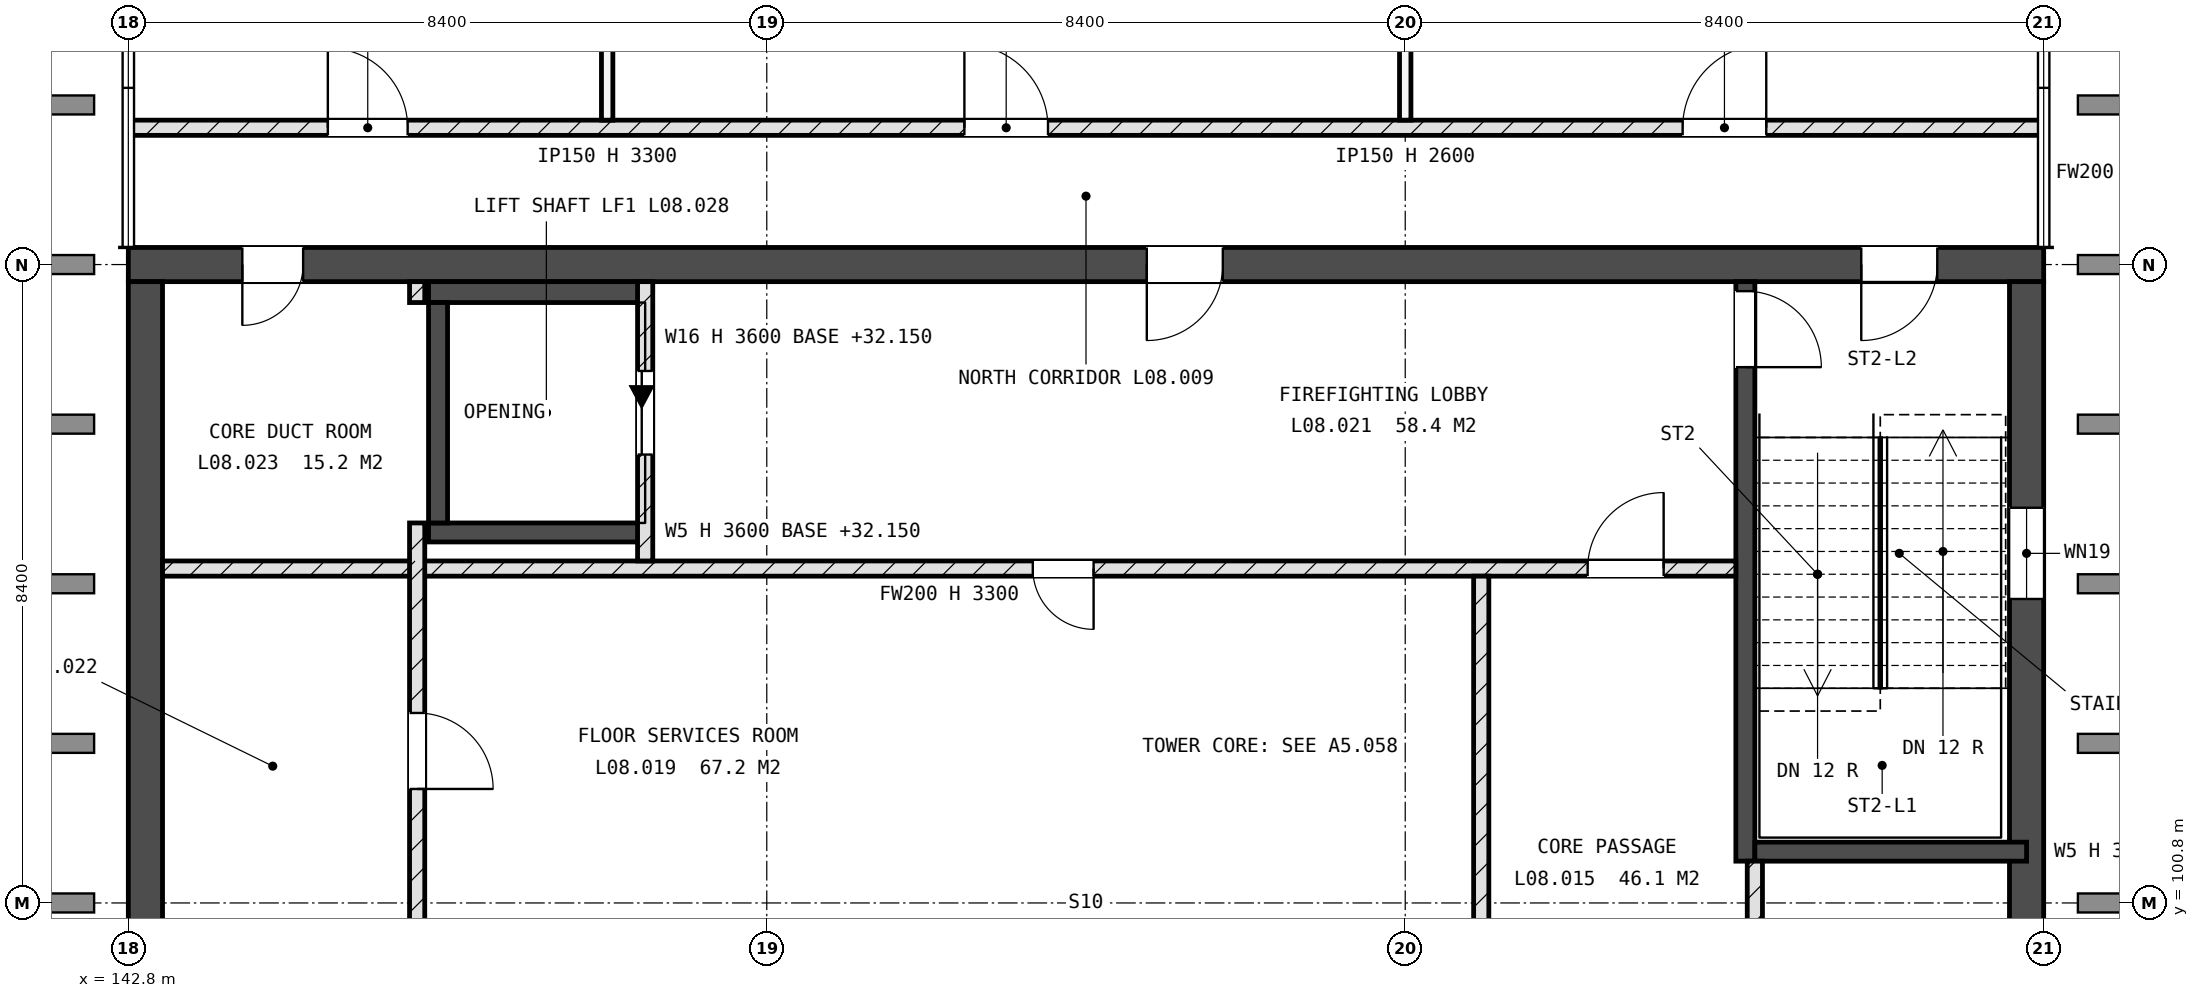
"""IFC4 building model, lengths in metres.
Left out: names, types, materials, properties, quantities, classifications, styles, units other than length and angle.
Written with IfcOpenShell. Run it as: python <this file> out.ifc"""

import sys

from ifc_helpers import new_model, si_unit, direction, frame, frame_2d, origin, place, context, subcontext, project, spatial, rectangle, extrude, element, fill, save


model = new_model("IFC4")
c1 = context("Model", 3, precision=1e-05, world=origin(), true_north=direction((0.0, 1.0)))
c2 = subcontext(c1, "Body", "Model", "MODEL_VIEW")
j1 = project(units=[si_unit("LENGTHUNIT", "METRE"), si_unit("PLANEANGLEUNIT", "RADIAN")], contexts=[c1])
p1 = place(None, origin())
s1 = spatial("IfcSite", under=j1, at=p1, CompositionType="ELEMENT")
p2 = place(p1, origin())
s2 = spatial("IfcBuilding", under=s1, at=p2, CompositionType="ELEMENT")
p3 = place(p2, frame((0.0, 0.0, 32.4)))
s3 = spatial("IfcBuildingStorey", under=s2, at=p3, CompositionType="ELEMENT", Elevation=32.4)
p4 = place(p3, frame((142.8, 109.2, -0.25), z_axis=(0.0, 0.0, 1.0), x_axis=(1.0, 0.0, 0.0)))
e1 = element("IfcWall", 1, at=p4, inside=s3, PredefinedType="SHEAR", context=c2, shape_type="SweptSolid", body=[
    extrude(rectangle(XDim=25.2, YDim=0.45, at=frame_2d((12.6, 0.0))), origin(), (0.0, 0.0, 1.0), 3.6),
])
p5 = place(p4, frame((22.8, 0.0, 0.25)))
e2 = element("IfcOpeningElement", 2, at=p5, cuts=e1, PredefinedType="OPENING", context=c2, shape_type="SweptSolid", body=[
    extrude(rectangle(XDim=1.0, YDim=2.1, at=frame_2d((0.5, 1.05))), frame((0.0, 0.235, 0.0), z_axis=(0.0, -1.0, 0.0), x_axis=(1.0, 0.0, 0.0)), (0.0, 0.0, 1.0), 0.47),
])
p6 = place(p4, frame((1.5, 0.0, 0.25)))
e3 = element("IfcOpeningElement", 3, at=p6, cuts=e1, PredefinedType="OPENING", context=c2, shape_type="SweptSolid", body=[
    extrude(rectangle(XDim=0.8, YDim=2.1, at=frame_2d((0.4, 1.05))), frame((0.0, 0.235, 0.0), z_axis=(0.0, -1.0, 0.0), x_axis=(1.0, 0.0, 0.0)), (0.0, 0.0, 1.0), 0.47),
])
p7 = place(p4, frame((13.4, 0.0, 0.25)))
e4 = element("IfcOpeningElement", 4, at=p7, cuts=e1, PredefinedType="OPENING", context=c2, shape_type="SweptSolid", body=[
    extrude(rectangle(XDim=1.0, YDim=2.1, at=frame_2d((0.5, 1.05))), frame((0.0, 0.235, 0.0), z_axis=(0.0, -1.0, 0.0), x_axis=(1.0, 0.0, 0.0)), (0.0, 0.0, 1.0), 0.47),
])
p8 = place(p3, frame((143.025, 92.625, -0.25), z_axis=(0.0, 0.0, 1.0), x_axis=(0.0, 1.0, 0.0)))
e5 = element("IfcWall", 5, at=p8, inside=s3, PredefinedType="SHEAR", context=c2, shape_type="SweptSolid", body=[
    extrude(rectangle(XDim=16.35, YDim=0.45, at=frame_2d((8.175, 0.0))), origin(), (0.0, 0.0, 1.0), 3.6),
])
p9 = place(p8, frame((2.975, 0.0, 1.85)))
e6 = element("IfcOpeningElement", 6, at=p9, cuts=e5, PredefinedType="OPENING", context=c2, shape_type="SweptSolid", body=[
    extrude(rectangle(XDim=1.2, YDim=0.9, at=frame_2d((0.6, 0.45))), frame((0.0, 0.235, 0.0), z_axis=(0.0, -1.0, 0.0), x_axis=(1.0, 0.0, 0.0)), (0.0, 0.0, 1.0), 0.47),
])
p10 = place(p3, frame((167.775, 92.625, -0.25), z_axis=(0.0, 0.0, 1.0), x_axis=(0.0, 1.0, 0.0)))
e7 = element("IfcWall", 7, at=p10, inside=s3, PredefinedType="SHEAR", context=c2, shape_type="SweptSolid", body=[
    extrude(rectangle(XDim=16.35, YDim=0.45, at=frame_2d((8.175, 0.0))), origin(), (0.0, 0.0, 1.0), 3.6),
])
p11 = place(p10, frame((12.175, 0.0, 1.85)))
e8 = element("IfcOpeningElement", 8, at=p11, cuts=e7, PredefinedType="OPENING", context=c2, shape_type="SweptSolid", body=[
    extrude(rectangle(XDim=1.2, YDim=0.9, at=frame_2d((0.6, 0.45))), frame((0.0, 0.235, 0.0), z_axis=(0.0, -1.0, 0.0), x_axis=(1.0, 0.0, 0.0)), (0.0, 0.0, 1.0), 0.47),
])
p12 = place(p3, frame((164.075, 101.35, -0.25), z_axis=(0.0, 0.0, 1.0), x_axis=(0.0, 1.0, 0.0)))
e9 = element("IfcWall", 9, at=p12, inside=s3, PredefinedType="SHEAR", context=c2, shape_type="SweptSolid", body=[
    extrude(rectangle(XDim=7.625, YDim=0.25, at=frame_2d((3.812, 0.0))), origin(), (0.0, 0.0, 1.0), 3.6),
])
p13 = place(p12, frame((6.5, 0.0, 0.25)))
e10 = element("IfcOpeningElement", 10, at=p13, cuts=e9, PredefinedType="OPENING", context=c2, shape_type="SweptSolid", body=[
    extrude(rectangle(XDim=1.0, YDim=2.1, at=frame_2d((0.5, 1.05))), frame((0.0, 0.135, 0.0), z_axis=(0.0, -1.0, 0.0), x_axis=(1.0, 0.0, 0.0)), (0.0, 0.0, 1.0), 0.27),
])
p14 = place(p3, frame((164.2, 101.475, -0.25), z_axis=(0.0, 0.0, 1.0), x_axis=(1.0, 0.0, 0.0)))
e11 = element("IfcWall", 11, at=p14, inside=s3, PredefinedType="SHEAR", context=c2, shape_type="SweptSolid", body=[
    extrude(rectangle(XDim=3.575, YDim=0.25, at=frame_2d((1.788, 0.0))), origin(), (0.0, 0.0, 1.0), 3.6),
])
p15 = place(p3, frame((146.75, 105.675, -0.25), z_axis=(0.0, 0.0, 1.0), x_axis=(1.0, 0.0, 0.0)))
e12 = element("IfcWall", 12, at=p15, inside=s3, PredefinedType="SHEAR", context=c2, shape_type="SweptSolid", body=[
    extrude(rectangle(XDim=2.85, YDim=0.25, at=frame_2d((1.425, 0.0))), origin(), (0.0, 0.0, 1.0), 3.6),
])
p16 = place(p3, frame((146.75, 108.837, -0.25), z_axis=(0.0, 0.0, 1.0), x_axis=(1.0, 0.0, 0.0)))
e13 = element("IfcWall", 13, at=p16, inside=s3, PredefinedType="SHEAR", context=c2, shape_type="SweptSolid", body=[
    extrude(rectangle(XDim=2.85, YDim=0.275, at=frame_2d((1.425, 0.0))), origin(), (0.0, 0.0, 1.0), 3.6),
])
p17 = place(p3, frame((146.875, 105.8, -0.25), z_axis=(0.0, 0.0, 1.0), x_axis=(0.0, 1.0, 0.0)))
e14 = element("IfcWall", 14, at=p17, inside=s3, PredefinedType="SHEAR", context=c2, shape_type="SweptSolid", body=[
    extrude(rectangle(XDim=2.9, YDim=0.25, at=frame_2d((1.45, 0.0))), origin(), (0.0, 0.0, 1.0), 3.6),
])
p18 = place(p3, frame((143.25, 105.2, 0.0), z_axis=(0.0, 0.0, 1.0), x_axis=(1.0, 0.0, 0.0)))
e15 = element("IfcWall", 15, at=p18, inside=s3, PredefinedType="SOLIDWALL", context=c2, shape_type="SweptSolid", body=[
    extrude(rectangle(XDim=20.7, YDim=0.2, at=frame_2d((10.35, 0.0))), origin(), (0.0, 0.0, 1.0), 3.3),
])
p19 = place(p18, frame((11.45, 0.0, 0.0)))
e16 = element("IfcOpeningElement", 16, at=p19, cuts=e15, PredefinedType="OPENING", context=c2, shape_type="SweptSolid", body=[
    extrude(rectangle(XDim=0.8, YDim=2.1, at=frame_2d((0.4, 1.05))), frame((0.0, 0.11, 0.0), z_axis=(0.0, -1.0, 0.0), x_axis=(1.0, 0.0, 0.0)), (0.0, 0.0, 1.0), 0.22),
])
p20 = place(p18, frame((18.75, 0.0, 0.0)))
e17 = element("IfcOpeningElement", 17, at=p20, cuts=e15, PredefinedType="OPENING", context=c2, shape_type="SweptSolid", body=[
    extrude(rectangle(XDim=1.0, YDim=2.1, at=frame_2d((0.5, 1.05))), frame((0.0, 0.11, 0.0), z_axis=(0.0, -1.0, 0.0), x_axis=(1.0, 0.0, 0.0)), (0.0, 0.0, 1.0), 0.22),
])
p21 = place(p3, frame((142.8, 111.0, 0.0), z_axis=(0.0, 0.0, 1.0), x_axis=(1.0, 0.0, 0.0)))
e18 = element("IfcWall", 18, at=p21, inside=s3, PredefinedType="SOLIDWALL", context=c2, shape_type="SweptSolid", body=[
    extrude(rectangle(XDim=25.2, YDim=0.2, at=frame_2d((12.6, 0.0))), origin(), (0.0, 0.0, 1.0), 3.3),
])
p22 = place(p21, frame((2.625, 0.0, 0.0)))
e19 = element("IfcOpeningElement", 19, at=p22, cuts=e18, PredefinedType="OPENING", context=c2, shape_type="SweptSolid", body=[
    extrude(rectangle(XDim=1.05, YDim=2.1, at=frame_2d((0.525, 1.05))), frame((0.0, 0.11, 0.0), z_axis=(0.0, -1.0, 0.0), x_axis=(1.0, 0.0, 0.0)), (0.0, 0.0, 1.0), 0.22),
])
p23 = place(p21, frame((11.0, 0.0, 0.0)))
e20 = element("IfcOpeningElement", 20, at=p23, cuts=e18, PredefinedType="OPENING", context=c2, shape_type="SweptSolid", body=[
    extrude(rectangle(XDim=1.1, YDim=2.25, at=frame_2d((0.55, 1.125))), frame((0.0, 0.11, 0.0), z_axis=(0.0, -1.0, 0.0), x_axis=(1.0, 0.0, 0.0)), (0.0, 0.0, 1.0), 0.22),
])
p24 = place(p21, frame((20.45, 0.0, 0.0)))
e21 = element("IfcOpeningElement", 21, at=p24, cuts=e18, PredefinedType="OPENING", context=c2, shape_type="SweptSolid", body=[
    extrude(rectangle(XDim=1.1, YDim=2.25, at=frame_2d((0.55, 1.125))), frame((0.0, 0.11, 0.0), z_axis=(0.0, -1.0, 0.0), x_axis=(1.0, 0.0, 0.0)), (0.0, 0.0, 1.0), 0.22),
])
p25 = place(p3, frame((146.6, 100.5, 0.0), z_axis=(0.0, 0.0, 1.0), x_axis=(0.0, 1.0, 0.0)))
e22 = element("IfcWall", 22, at=p25, inside=s3, PredefinedType="SOLIDWALL", context=c2, shape_type="SweptSolid", body=[
    extrude(rectangle(XDim=5.3, YDim=0.2, at=frame_2d((2.65, 0.0))), origin(), (0.0, 0.0, 1.0), 3.3),
])
p26 = place(p25, frame((1.8, 0.0, 0.0)))
e23 = element("IfcOpeningElement", 23, at=p26, cuts=e22, PredefinedType="OPENING", context=c2, shape_type="SweptSolid", body=[
    extrude(rectangle(XDim=1.0, YDim=2.1, at=frame_2d((0.5, 1.05))), frame((0.0, 0.11, 0.0), z_axis=(0.0, -1.0, 0.0), x_axis=(1.0, 0.0, 0.0)), (0.0, 0.0, 1.0), 0.22),
])
p27 = place(p3, frame((146.6, 108.7, 0.0), z_axis=(0.0, 0.0, 1.0), x_axis=(0.0, 1.0, 0.0)))
e24 = element("IfcWall", 24, at=p27, inside=s3, PredefinedType="SOLIDWALL", context=c2, shape_type="SweptSolid", body=[
    extrude(rectangle(XDim=0.275, YDim=0.2, at=frame_2d((0.138, 0.0))), origin(), (0.0, 0.0, 1.0), 3.3),
])
p28 = place(p3, frame((149.1, 111.1, 0.0), z_axis=(0.0, 0.0, 1.0), x_axis=(0.0, 1.0, 0.0)))
e25 = element("IfcWall", 25, at=p28, inside=s3, PredefinedType="PARTITIONING", context=c2, shape_type="SweptSolid", body=[
    extrude(rectangle(XDim=6.5, YDim=0.15, at=frame_2d((3.25, 0.0))), origin(), (0.0, 0.0, 1.0), 3.3),
])
p29 = place(p3, frame((149.6, 105.3, 0.0), z_axis=(0.0, 0.0, 1.0), x_axis=(0.0, 1.0, 0.0)))
e26 = element("IfcWall", 26, at=p29, inside=s3, PredefinedType="SOLIDWALL", context=c2, shape_type="SweptSolid", body=[
    extrude(rectangle(XDim=3.675, YDim=0.2, at=frame_2d((1.837, 0.0))), origin(), (0.0, 0.0, 1.0), 3.3),
])
p30 = place(p29, frame((1.4, 0.0, 0.0)))
e27 = element("IfcOpeningElement", 27, at=p30, cuts=e26, PredefinedType="OPENING", context=c2, shape_type="SweptSolid", body=[
    extrude(rectangle(XDim=1.1, YDim=2.1, at=frame_2d((0.55, 1.05))), frame((0.0, 0.11, 0.0), z_axis=(0.0, -1.0, 0.0), x_axis=(1.0, 0.0, 0.0)), (0.0, 0.0, 1.0), 0.22),
])
p31 = place(p3, frame((159.6, 111.1, 0.0), z_axis=(0.0, 0.0, 1.0), x_axis=(0.0, 1.0, 0.0)))
e28 = element("IfcWall", 28, at=p31, inside=s3, PredefinedType="PARTITIONING", context=c2, shape_type="SweptSolid", body=[
    extrude(rectangle(XDim=6.5, YDim=0.15, at=frame_2d((3.25, 0.0))), origin(), (0.0, 0.0, 1.0), 2.6),
])
p32 = place(p3, frame((160.6, 92.625, 0.0), z_axis=(0.0, 0.0, 1.0), x_axis=(0.0, 1.0, 0.0)))
e29 = element("IfcWall", 29, at=p32, inside=s3, PredefinedType="SOLIDWALL", context=c2, shape_type="SweptSolid", body=[
    extrude(rectangle(XDim=12.475, YDim=0.2, at=frame_2d((6.238, 0.0))), origin(), (0.0, 0.0, 1.0), 3.3),
])
p33 = place(p32, frame((5.075, 0.0, 0.0)))
e30 = element("IfcOpeningElement", 30, at=p33, cuts=e29, PredefinedType="OPENING", context=c2, shape_type="SweptSolid", body=[
    extrude(rectangle(XDim=0.8, YDim=2.1, at=frame_2d((0.4, 1.05))), frame((0.0, 0.11, 0.0), z_axis=(0.0, -1.0, 0.0), x_axis=(1.0, 0.0, 0.0)), (0.0, 0.0, 1.0), 0.22),
])
p34 = place(p32, frame((0.775, 0.0, 0.0)))
e31 = element("IfcOpeningElement", 31, at=p34, cuts=e29, PredefinedType="OPENING", context=c2, shape_type="SweptSolid", body=[
    extrude(rectangle(XDim=1.0, YDim=2.1, at=frame_2d((0.5, 1.05))), frame((0.0, 0.11, 0.0), z_axis=(0.0, -1.0, 0.0), x_axis=(1.0, 0.0, 0.0)), (0.0, 0.0, 1.0), 0.22),
])
p35 = place(p3, frame((164.2, 92.625, 0.0), z_axis=(0.0, 0.0, 1.0), x_axis=(0.0, 1.0, 0.0)))
e32 = element("IfcWall", 32, at=p35, inside=s3, PredefinedType="SOLIDWALL", context=c2, shape_type="SweptSolid", body=[
    extrude(rectangle(XDim=8.725, YDim=0.2, at=frame_2d((4.363, 0.0))), origin(), (0.0, 0.0, 1.0), 3.3),
])
p36 = place(p35, frame((1.675, 0.0, 0.0)))
e33 = element("IfcOpeningElement", 33, at=p36, cuts=e32, PredefinedType="OPENING", context=c2, shape_type="SweptSolid", body=[
    extrude(rectangle(XDim=0.8, YDim=2.1, at=frame_2d((0.4, 1.05))), frame((0.0, 0.11, 0.0), z_axis=(0.0, -1.0, 0.0), x_axis=(1.0, 0.0, 0.0)), (0.0, 0.0, 1.0), 0.22),
])
p37 = place(p35, frame((6.275, 0.0, 0.0)))
e34 = element("IfcOpeningElement", 34, at=p37, cuts=e32, PredefinedType="OPENING", context=c2, shape_type="SweptSolid", body=[
    extrude(rectangle(XDim=0.8, YDim=2.1, at=frame_2d((0.4, 1.05))), frame((0.0, 0.11, 0.0), z_axis=(0.0, -1.0, 0.0), x_axis=(1.0, 0.0, 0.0)), (0.0, 0.0, 1.0), 0.22),
])
p38 = place(p11, origin())
e35 = element("IfcWindow", 35, at=p38, inside=s3, PartitioningType="SINGLE_PANEL", PredefinedType="WINDOW", context=c2, shape_type="SweptSolid", body=[
    extrude(rectangle(XDim=1.2, YDim=0.9, at=frame_2d((0.6, 0.45))), frame((0.0, 0.03, 0.0), z_axis=(0.0, -1.0, 0.0), x_axis=(1.0, 0.0, 0.0)), (0.0, 0.0, 1.0), 0.06),
])
fill(e8, e35)
p39 = place(p30, origin())
e36 = element("IfcDoor", 36, at=p39, inside=s3, OperationType="SLIDING_TO_LEFT", PredefinedType="DOOR", context=c2, shape_type="SweptSolid", body=[
    extrude(rectangle(XDim=1.1, YDim=2.1, at=frame_2d((0.55, 1.05))), frame((0.0, 0.025, 0.0), z_axis=(0.0, -1.0, 0.0), x_axis=(1.0, 0.0, 0.0)), (0.0, 0.0, 1.0), 0.05),
])
fill(e27, e36)
p40 = place(p13, origin())
e37 = element("IfcDoor", 37, at=p40, inside=s3, OperationType="SINGLE_SWING_LEFT", PredefinedType="DOOR", context=c2, shape_type="SweptSolid", body=[
    extrude(rectangle(XDim=1.0, YDim=2.1, at=frame_2d((0.5, 1.05))), frame((0.0, 0.025, 0.0), z_axis=(0.0, -1.0, 0.0), x_axis=(1.0, 0.0, 0.0)), (0.0, 0.0, 1.0), 0.05),
])
fill(e10, e37)
p41 = place(p5, origin())
e38 = element("IfcDoor", 38, at=p41, inside=s3, OperationType="SINGLE_SWING_LEFT", PredefinedType="DOOR", context=c2, shape_type="SweptSolid", body=[
    extrude(rectangle(XDim=1.0, YDim=2.1, at=frame_2d((0.5, 1.05))), frame((0.0, 0.025, 0.0), z_axis=(0.0, -1.0, 0.0), x_axis=(1.0, 0.0, 0.0)), (0.0, 0.0, 1.0), 0.05),
])
fill(e2, e38)
p42 = place(p22, origin())
e39 = element("IfcDoor", 39, at=p42, inside=s3, OperationType="SINGLE_SWING_RIGHT", PredefinedType="DOOR", context=c2, shape_type="SweptSolid", body=[
    extrude(rectangle(XDim=1.05, YDim=2.1, at=frame_2d((0.525, 1.05))), frame((0.0, 0.025, 0.0), z_axis=(0.0, -1.0, 0.0), x_axis=(1.0, 0.0, 0.0)), (0.0, 0.0, 1.0), 0.05),
])
fill(e19, e39)
p43 = place(p23, origin())
e40 = element("IfcDoor", 40, at=p43, inside=s3, OperationType="SINGLE_SWING_RIGHT", PredefinedType="DOOR", context=c2, shape_type="SweptSolid", body=[
    extrude(rectangle(XDim=1.1, YDim=2.25, at=frame_2d((0.55, 1.125))), frame((0.0, 0.025, 0.0), z_axis=(0.0, -1.0, 0.0), x_axis=(1.0, 0.0, 0.0)), (0.0, 0.0, 1.0), 0.05),
])
fill(e20, e40)
p44 = place(p24, origin())
e41 = element("IfcDoor", 41, at=p44, inside=s3, OperationType="SINGLE_SWING_LEFT", PredefinedType="DOOR", context=c2, shape_type="SweptSolid", body=[
    extrude(rectangle(XDim=1.1, YDim=2.25, at=frame_2d((0.55, 1.125))), frame((0.0, 0.025, 0.0), z_axis=(0.0, -1.0, 0.0), x_axis=(1.0, 0.0, 0.0)), (0.0, 0.0, 1.0), 0.05),
])
fill(e21, e41)
p45 = place(p19, origin())
e42 = element("IfcDoor", 42, at=p45, inside=s3, OperationType="SINGLE_SWING_RIGHT", PredefinedType="DOOR", context=c2, shape_type="SweptSolid", body=[
    extrude(rectangle(XDim=0.8, YDim=2.1, at=frame_2d((0.4, 1.05))), frame((0.0, 0.025, 0.0), z_axis=(0.0, -1.0, 0.0), x_axis=(1.0, 0.0, 0.0)), (0.0, 0.0, 1.0), 0.05),
])
fill(e16, e42)
p46 = place(p26, origin())
e43 = element("IfcDoor", 43, at=p46, inside=s3, OperationType="SINGLE_SWING_LEFT", PredefinedType="DOOR", context=c2, shape_type="SweptSolid", body=[
    extrude(rectangle(XDim=1.0, YDim=2.1, at=frame_2d((0.5, 1.05))), frame((0.0, 0.025, 0.0), z_axis=(0.0, -1.0, 0.0), x_axis=(1.0, 0.0, 0.0)), (0.0, 0.0, 1.0), 0.05),
])
fill(e23, e43)
p47 = place(p6, origin())
e44 = element("IfcDoor", 44, at=p47, inside=s3, OperationType="SINGLE_SWING_LEFT", PredefinedType="DOOR", context=c2, shape_type="SweptSolid", body=[
    extrude(rectangle(XDim=0.8, YDim=2.1, at=frame_2d((0.4, 1.05))), frame((0.0, 0.025, 0.0), z_axis=(0.0, -1.0, 0.0), x_axis=(1.0, 0.0, 0.0)), (0.0, 0.0, 1.0), 0.05),
])
fill(e3, e44)
p48 = place(p7, origin())
e45 = element("IfcDoor", 45, at=p48, inside=s3, OperationType="SINGLE_SWING_LEFT", PredefinedType="DOOR", context=c2, shape_type="SweptSolid", body=[
    extrude(rectangle(XDim=1.0, YDim=2.1, at=frame_2d((0.5, 1.05))), frame((0.0, 0.025, 0.0), z_axis=(0.0, -1.0, 0.0), x_axis=(1.0, 0.0, 0.0)), (0.0, 0.0, 1.0), 0.05),
])
fill(e4, e45)
p49 = place(p20, origin())
e46 = element("IfcDoor", 46, at=p49, inside=s3, OperationType="SINGLE_SWING_LEFT", PredefinedType="DOOR", context=c2, shape_type="SweptSolid", body=[
    extrude(rectangle(XDim=1.0, YDim=2.1, at=frame_2d((0.5, 1.05))), frame((0.0, 0.025, 0.0), z_axis=(0.0, -1.0, 0.0), x_axis=(1.0, 0.0, 0.0)), (0.0, 0.0, 1.0), 0.05),
])
fill(e17, e46)
save(model, sys.argv[1])
